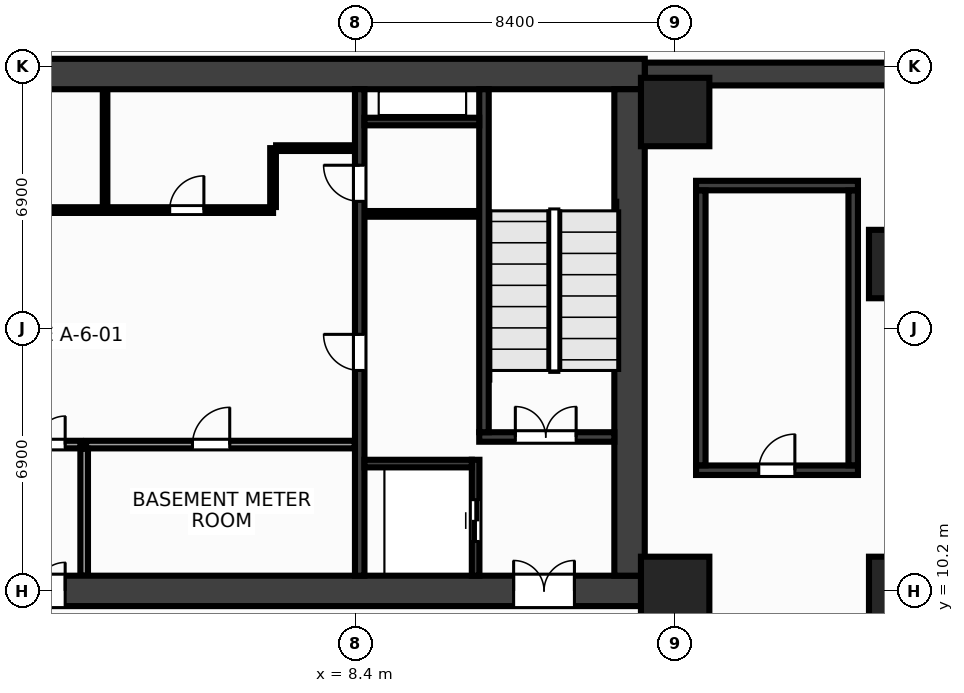
"""IFC4 building model, lengths in metres.
Left out: names, types, materials, properties, quantities, classifications, styles, units other than length and angle.
Written with IfcOpenShell. Run it as: python <this file> out.ifc"""

import sys

from ifc_helpers import new_model, si_unit, direction, frame, frame_2d, origin, origin_2d, place, context, subcontext, project, spatial, rectangle, extrude, source, transform, mapped, element, fill, save


model = new_model("IFC4")
c1 = context("Model", 3, precision=1e-05, world=origin(), true_north=direction((0.0, 1.0)))
c2 = subcontext(c1, "Body", "Model", "MODEL_VIEW")
j1 = project(units=[si_unit("LENGTHUNIT", "METRE"), si_unit("PLANEANGLEUNIT", "RADIAN")], contexts=[c1])
p1 = place(None, origin())
s1 = spatial("IfcSite", under=j1, at=p1, CompositionType="ELEMENT")
p2 = place(p1, origin())
s2 = spatial("IfcBuilding", under=s1, at=p2, CompositionType="ELEMENT")
p3 = place(p2, frame((0.0, 0.0, -5.5)))
s3 = spatial("IfcBuildingStorey", under=s2, at=p3, CompositionType="ELEMENT", Elevation=-5.5)
m1 = source(origin(), c2, "Body", "SweptSolid", [
    extrude(rectangle(XDim=22.9, YDim=0.6, at=frame_2d((11.45, 0.0))), origin(), (0.0, 0.0, 1.0), 5.5),
])
p4 = place(p3, frame((16.0, 23.8, 0.0), z_axis=(0.0, 0.0, 1.0), x_axis=(1.0, 0.0, 0.0)))
e1 = element("IfcWall", 1, at=p4, inside=s3, PredefinedType="SHEAR", context=c2, shape_type="MappedRepresentation", body=[
    mapped(m1, transform((0.0, 0.0, 0.0), x_axis=(1.0, 0.0, 0.0), y_axis=(0.0, 1.0, 0.0), z_axis=(0.0, 0.0, 1.0), scale=1.0)),
])
m2 = source(origin(), c2, "Body", "SweptSolid", [
    extrude(rectangle(XDim=32.0, YDim=0.8, at=frame_2d((16.0, 0.0))), origin(), (0.0, 0.0, 1.0), 5.5),
])
p5 = place(p3, frame((-16.0, 23.8, 0.0), z_axis=(0.0, 0.0, 1.0), x_axis=(1.0, 0.0, 0.0)))
e2 = element("IfcWall", 2, at=p5, inside=s3, PredefinedType="SHEAR", context=c2, shape_type="MappedRepresentation", body=[
    mapped(m2, transform((0.0, 0.0, 0.0), x_axis=(1.0, 0.0, 0.0), y_axis=(0.0, 1.0, 0.0), z_axis=(0.0, 0.0, 1.0), scale=1.0)),
])
p6 = place(p3, frame((-16.0, 10.2, 0.0), z_axis=(0.0, 0.0, 1.0), x_axis=(1.0, 0.0, 0.0)))
e3 = element("IfcWall", 3, at=p6, inside=s3, PredefinedType="SHEAR", context=c2, shape_type="MappedRepresentation", body=[
    mapped(m2, transform((0.0, 0.0, 0.0), x_axis=(1.0, 0.0, 0.0), y_axis=(0.0, 1.0, 0.0), z_axis=(0.0, 0.0, 1.0), scale=1.0)),
])
p7 = place(p6, frame((1.85, 0.0, 0.0)))
e4 = element("IfcOpeningElement", 4, at=p7, cuts=e3, PredefinedType="OPENING", context=c2, shape_type="SweptSolid", body=[
    extrude(rectangle(XDim=1.6, YDim=2.15, at=frame_2d((0.8, 1.075))), frame((0.0, 0.412, 0.0), z_axis=(0.0, -1.0, 0.0), x_axis=(1.0, 0.0, 0.0)), (0.0, 0.0, 1.0), 0.824),
])
p8 = place(p6, frame((28.55, 0.0, 0.0)))
e5 = element("IfcOpeningElement", 5, at=p8, cuts=e3, PredefinedType="OPENING", context=c2, shape_type="SweptSolid", body=[
    extrude(rectangle(XDim=1.6, YDim=2.15, at=frame_2d((0.8, 1.075))), frame((0.0, 0.412, 0.0), z_axis=(0.0, -1.0, 0.0), x_axis=(1.0, 0.0, 0.0)), (0.0, 0.0, 1.0), 0.824),
])
p9 = place(p6, frame((15.25, 0.0, 0.0)))
e6 = element("IfcOpeningElement", 6, at=p9, cuts=e3, PredefinedType="OPENING", context=c2, shape_type="SweptSolid", body=[
    extrude(rectangle(XDim=1.5, YDim=2.2, at=frame_2d((0.75, 1.1))), frame((0.0, 0.412, 0.0), z_axis=(0.0, -1.0, 0.0), x_axis=(1.0, 0.0, 0.0)), (0.0, 0.0, 1.0), 0.824),
])
m3 = source(origin(), c2, "Body", "SweptSolid", [
    extrude(rectangle(XDim=12.8, YDim=0.8, at=frame_2d((6.4, 0.0))), origin(), (0.0, 0.0, 1.0), 5.5),
])
p10 = place(p3, frame((15.6, 10.6, 0.0), z_axis=(0.0, 0.0, 1.0), x_axis=(0.0, 1.0, 0.0)))
e7 = element("IfcWall", 7, at=p10, inside=s3, PredefinedType="SHEAR", context=c2, shape_type="MappedRepresentation", body=[
    mapped(m3, transform((0.0, 0.0, 0.0), x_axis=(1.0, 0.0, 0.0), y_axis=(0.0, 1.0, 0.0), z_axis=(0.0, 0.0, 1.0), scale=1.0)),
])
m4 = source(origin(), c2, "Body", "SweptSolid", [
    extrude(rectangle(XDim=12.8, YDim=0.25, at=frame_2d((6.4, 0.0))), origin(), (0.0, 0.0, 1.0), 5.5),
])
p11 = place(p3, frame((8.5, 10.6, 0.0), z_axis=(0.0, 0.0, 1.0), x_axis=(0.0, 1.0, 0.0)))
e8 = element("IfcWall", 8, at=p11, inside=s3, PredefinedType="SHEAR", context=c2, shape_type="MappedRepresentation", body=[
    mapped(m4, transform((0.0, 0.0, 0.0), x_axis=(1.0, 0.0, 0.0), y_axis=(0.0, 1.0, 0.0), z_axis=(0.0, 0.0, 1.0), scale=1.0)),
])
p12 = place(p11, frame((5.4, 0.0, 0.0)))
e9 = element("IfcOpeningElement", 9, at=p12, cuts=e8, PredefinedType="OPENING", context=c2, shape_type="SweptSolid", body=[
    extrude(rectangle(XDim=0.95, YDim=2.15, at=frame_2d((0.475, 1.075))), frame((0.0, 0.137, 0.0), z_axis=(0.0, -1.0, 0.0), x_axis=(1.0, 0.0, 0.0)), (0.0, 0.0, 1.0), 0.274),
])
p13 = place(p11, frame((9.85, 0.0, 0.0)))
e10 = element("IfcOpeningElement", 10, at=p13, cuts=e8, PredefinedType="OPENING", context=c2, shape_type="SweptSolid", body=[
    extrude(rectangle(XDim=0.95, YDim=2.15, at=frame_2d((0.475, 1.075))), frame((0.0, 0.137, 0.0), z_axis=(0.0, -1.0, 0.0), x_axis=(1.0, 0.0, 0.0)), (0.0, 0.0, 1.0), 0.274),
])
m5 = source(origin(), c2, "Body", "SweptSolid", [
    extrude(rectangle(XDim=3.555, YDim=0.25, at=frame_2d((1.777, 0.0))), origin(), (0.0, 0.0, 1.0), 5.5),
])
p14 = place(p3, frame((11.645, 14.25, 0.0), z_axis=(0.0, 0.0, 1.0), x_axis=(1.0, 0.0, 0.0)))
e11 = element("IfcWall", 11, at=p14, inside=s3, PredefinedType="SHEAR", context=c2, shape_type="MappedRepresentation", body=[
    mapped(m5, transform((0.0, 0.0, 0.0), x_axis=(1.0, 0.0, 0.0), y_axis=(0.0, 1.0, 0.0), z_axis=(0.0, 0.0, 1.0), scale=1.0)),
])
p15 = place(p14, frame((0.95, 0.0, 0.0)))
e12 = element("IfcOpeningElement", 12, at=p15, cuts=e11, PredefinedType="OPENING", context=c2, shape_type="SweptSolid", body=[
    extrude(rectangle(XDim=1.6, YDim=2.15, at=frame_2d((0.8, 1.075))), frame((0.0, 0.137, 0.0), z_axis=(0.0, -1.0, 0.0), x_axis=(1.0, 0.0, 0.0)), (0.0, 0.0, 1.0), 0.274),
])
m6 = source(origin(), c2, "Body", "SweptSolid", [
    extrude(rectangle(XDim=9.025, YDim=0.25, at=frame_2d((4.512, 0.0))), origin(), (0.0, 0.0, 1.0), 5.5),
])
p16 = place(p3, frame((11.77, 14.375, 0.0), z_axis=(0.0, 0.0, 1.0), x_axis=(0.0, 1.0, 0.0)))
e13 = element("IfcWall", 13, at=p16, inside=s3, PredefinedType="SHEAR", context=c2, shape_type="MappedRepresentation", body=[
    mapped(m6, transform((0.0, 0.0, 0.0), x_axis=(1.0, 0.0, 0.0), y_axis=(0.0, 1.0, 0.0), z_axis=(0.0, 0.0, 1.0), scale=1.0)),
])
m7 = source(origin(), c2, "Body", "SweptSolid", [
    extrude(rectangle(XDim=3.05, YDim=0.2, at=frame_2d((1.525, 0.0))), origin(), (0.0, 0.0, 1.0), 5.5),
])
p17 = place(p3, frame((11.55, 10.6, 0.0), z_axis=(0.0, 0.0, 1.0), x_axis=(0.0, 1.0, 0.0)))
e14 = element("IfcWall", 14, at=p17, inside=s3, PredefinedType="SHEAR", context=c2, shape_type="MappedRepresentation", body=[
    mapped(m7, transform((0.0, 0.0, 0.0), x_axis=(1.0, 0.0, 0.0), y_axis=(0.0, 1.0, 0.0), z_axis=(0.0, 0.0, 1.0), scale=1.0)),
])
p18 = place(p17, frame((0.9, 0.0, 0.0)))
e15 = element("IfcOpeningElement", 15, at=p18, cuts=e14, PredefinedType="OPENING", context=c2, shape_type="SweptSolid", body=[
    extrude(rectangle(XDim=1.1, YDim=2.15, at=frame_2d((0.55, 1.075))), frame((0.0, 0.112, 0.0), z_axis=(0.0, -1.0, 0.0), x_axis=(1.0, 0.0, 0.0)), (0.0, 0.0, 1.0), 0.224),
])
m8 = source(origin(), c2, "Body", "SweptSolid", [
    extrude(rectangle(XDim=2.825, YDim=0.2, at=frame_2d((1.413, 0.0))), origin(), (0.0, 0.0, 1.0), 5.5),
])
p19 = place(p3, frame((8.625, 13.55, 0.0), z_axis=(0.0, 0.0, 1.0), x_axis=(1.0, 0.0, 0.0)))
e16 = element("IfcWall", 16, at=p19, inside=s3, PredefinedType="SHEAR", context=c2, shape_type="MappedRepresentation", body=[
    mapped(m8, transform((0.0, 0.0, 0.0), x_axis=(1.0, 0.0, 0.0), y_axis=(0.0, 1.0, 0.0), z_axis=(0.0, 0.0, 1.0), scale=1.0)),
])
m9 = source(origin(), c2, "Body", "SweptSolid", [
    extrude(rectangle(XDim=3.02, YDim=0.2, at=frame_2d((1.51, 0.0))), origin(), (0.0, 0.0, 1.0), 5.5),
])
p20 = place(p3, frame((8.625, 22.55, 0.0), z_axis=(0.0, 0.0, 1.0), x_axis=(1.0, 0.0, 0.0)))
e17 = element("IfcWall", 17, at=p20, inside=s3, PredefinedType="SHEAR", context=c2, shape_type="MappedRepresentation", body=[
    mapped(m9, transform((0.0, 0.0, 0.0), x_axis=(1.0, 0.0, 0.0), y_axis=(0.0, 1.0, 0.0), z_axis=(0.0, 0.0, 1.0), scale=1.0)),
])
m10 = source(origin(), c2, "Body", "SweptSolid", [
    extrude(rectangle(XDim=4.26, YDim=0.25, at=frame_2d((2.13, 0.0))), origin(), (0.0, 0.0, 1.0), 5.5),
])
p21 = place(p3, frame((17.35, 20.865, 0.0), z_axis=(0.0, 0.0, 1.0), x_axis=(1.0, 0.0, 0.0)))
e18 = element("IfcWall", 18, at=p21, inside=s3, PredefinedType="SHEAR", context=c2, shape_type="MappedRepresentation", body=[
    mapped(m10, transform((0.0, 0.0, 0.0), x_axis=(1.0, 0.0, 0.0), y_axis=(0.0, 1.0, 0.0), z_axis=(0.0, 0.0, 1.0), scale=1.0)),
])
p22 = place(p3, frame((17.35, 13.375, 0.0), z_axis=(0.0, 0.0, 1.0), x_axis=(1.0, 0.0, 0.0)))
e19 = element("IfcWall", 19, at=p22, inside=s3, PredefinedType="SHEAR", context=c2, shape_type="MappedRepresentation", body=[
    mapped(m10, transform((0.0, 0.0, 0.0), x_axis=(1.0, 0.0, 0.0), y_axis=(0.0, 1.0, 0.0), z_axis=(0.0, 0.0, 1.0), scale=1.0)),
])
p23 = place(p22, frame((1.65, 0.0, 0.0)))
e20 = element("IfcOpeningElement", 20, at=p23, cuts=e19, PredefinedType="OPENING", context=c2, shape_type="SweptSolid", body=[
    extrude(rectangle(XDim=0.95, YDim=2.15, at=frame_2d((0.475, 1.075))), frame((0.0, 0.137, 0.0), z_axis=(0.0, -1.0, 0.0), x_axis=(1.0, 0.0, 0.0)), (0.0, 0.0, 1.0), 0.274),
])
m11 = source(origin(), c2, "Body", "SweptSolid", [
    extrude(rectangle(XDim=7.23, YDim=0.25, at=frame_2d((3.615, 0.0))), origin(), (0.0, 0.0, 1.0), 5.5),
])
for number, where, z_axis, x_axis in (
    (21, (17.475, 13.505, 0.0), (0.0, 0.0, 1.0), (0.0, 1.0, 0.0)),
    (22, (21.485, 13.505, 0.0), (0.0, 0.0, 1.0), (0.0, 1.0, 0.0)),
):
    element("IfcWall", number, at=place(p3, frame(where, z_axis=z_axis, x_axis=x_axis)), inside=s3, PredefinedType="SHEAR", context=c2, shape_type="MappedRepresentation", body=[
        mapped(m11, transform((0.0, 0.0, 0.0), x_axis=(1.0, 0.0, 0.0), y_axis=(0.0, 1.0, 0.0), z_axis=(0.0, 0.0, 1.0), scale=1.0)),
    ])
m12 = source(origin(), c2, "Body", "SweptSolid", [
    extrude(rectangle(XDim=1.8, YDim=1.8, at=origin_2d()), origin(), (0.0, 0.0, 1.0), 5.5),
])
for number, where, z_axis, x_axis in (
    (23, (16.8, 10.2, 0.0), (0.0, 0.0, 1.0), (1.0, 0.0, 0.0)),
    (24, (16.8, 22.8, 0.0), (0.0, 0.0, 1.0), (1.0, 0.0, 0.0)),
    (25, (22.8, 10.2, 0.0), (0.0, 0.0, 1.0), (1.0, 0.0, 0.0)),
    (26, (22.8, 18.8, 0.0), (0.0, 0.0, 1.0), (1.0, 0.0, 0.0)),
):
    element("IfcColumn", number, at=place(p3, frame(where, z_axis=z_axis, x_axis=x_axis)), inside=s3, PredefinedType="COLUMN", context=c2, shape_type="MappedRepresentation", body=[
        mapped(m12, transform((0.0, 0.0, 0.0), x_axis=(1.0, 0.0, 0.0), y_axis=(0.0, 1.0, 0.0), z_axis=(0.0, 0.0, 1.0), scale=1.0)),
    ])
m13 = source(origin(), c2, "Body", "SweptSolid", [
    extrude(rectangle(XDim=3.01, YDim=0.15, at=frame_2d((1.505, 0.0))), origin(), (0.0, 0.0, 1.0), 5.14),
])
p24 = place(p3, frame((8.63, 20.12, 0.0), z_axis=(0.0, 0.0, 1.0), x_axis=(1.0, 0.0, 0.0)))
e27 = element("IfcWall", 27, at=p24, inside=s3, PredefinedType="PARTITIONING", context=c2, shape_type="MappedRepresentation", body=[
    mapped(m13, transform((0.0, 0.0, 0.0), x_axis=(1.0, 0.0, 0.0), y_axis=(0.0, 1.0, 0.0), z_axis=(0.0, 0.0, 1.0), scale=1.0)),
])
m14 = source(origin(), c2, "Body", "SweptSolid", [
    extrude(rectangle(XDim=7.07, YDim=0.2, at=frame_2d((3.535, 0.0))), origin(), (0.0, 0.0, 1.0), 5.14),
])
p25 = place(p3, frame((1.3, 14.05, 0.0), z_axis=(0.0, 0.0, 1.0), x_axis=(1.0, 0.0, 0.0)))
e28 = element("IfcWall", 28, at=p25, inside=s3, PredefinedType="PARTITIONING", context=c2, shape_type="MappedRepresentation", body=[
    mapped(m14, transform((0.0, 0.0, 0.0), x_axis=(1.0, 0.0, 0.0), y_axis=(0.0, 1.0, 0.0), z_axis=(0.0, 0.0, 1.0), scale=1.0)),
])
p26 = place(p25, frame((2.8, 0.0, 0.0)))
e29 = element("IfcOpeningElement", 29, at=p26, cuts=e28, PredefinedType="OPENING", context=c2, shape_type="SweptSolid", body=[
    extrude(rectangle(XDim=0.98, YDim=2.15, at=frame_2d((0.49, 1.075))), frame((0.0, 0.112, 0.0), z_axis=(0.0, -1.0, 0.0), x_axis=(1.0, 0.0, 0.0)), (0.0, 0.0, 1.0), 0.224),
])
m15 = source(origin(), c2, "Body", "SweptSolid", [
    extrude(rectangle(XDim=3.34, YDim=0.2, at=frame_2d((1.67, 0.0))), origin(), (0.0, 0.0, 1.0), 5.14),
])
p27 = place(p3, frame((1.25, 10.6, 0.0), z_axis=(0.0, 0.0, 1.0), x_axis=(0.0, 1.0, 0.0)))
e30 = element("IfcWall", 30, at=p27, inside=s3, PredefinedType="PARTITIONING", context=c2, shape_type="MappedRepresentation", body=[
    mapped(m15, transform((0.0, 0.0, 0.0), x_axis=(1.0, 0.0, 0.0), y_axis=(0.0, 1.0, 0.0), z_axis=(0.0, 0.0, 1.0), scale=1.0)),
])
m16 = source(origin(), c2, "Body", "SweptSolid", [
    extrude(rectangle(XDim=2.3, YDim=0.2, at=frame_2d((1.15, 0.0))), origin(), (0.0, 0.0, 1.0), 5.14),
])
p28 = place(p3, frame((-1.15, 14.05, 0.0), z_axis=(0.0, 0.0, 1.0), x_axis=(1.0, 0.0, 0.0)))
e31 = element("IfcWall", 31, at=p28, inside=s3, PredefinedType="PARTITIONING", context=c2, shape_type="MappedRepresentation", body=[
    mapped(m16, transform((0.0, 0.0, 0.0), x_axis=(1.0, 0.0, 0.0), y_axis=(0.0, 1.0, 0.0), z_axis=(0.0, 0.0, 1.0), scale=1.0)),
])
p29 = place(p28, frame((0.4, 0.0, 0.0)))
e32 = element("IfcOpeningElement", 32, at=p29, cuts=e31, PredefinedType="OPENING", context=c2, shape_type="SweptSolid", body=[
    extrude(rectangle(XDim=1.5, YDim=2.2, at=frame_2d((0.75, 1.1))), frame((0.0, 0.112, 0.0), z_axis=(0.0, -1.0, 0.0), x_axis=(1.0, 0.0, 0.0)), (0.0, 0.0, 1.0), 0.224),
])
m17 = source(origin(), c2, "Body", "SweptSolid", [
    extrude(rectangle(XDim=14.59, YDim=0.15, at=frame_2d((7.295, 0.0))), origin(), (0.0, 0.0, 1.0), 5.14),
])
p30 = place(p3, frame((-8.37, 20.22, 0.0), z_axis=(0.0, 0.0, 1.0), x_axis=(1.0, 0.0, 0.0)))
e33 = element("IfcWall", 33, at=p30, inside=s3, PredefinedType="PARTITIONING", context=c2, shape_type="MappedRepresentation", body=[
    mapped(m17, transform((0.0, 0.0, 0.0), x_axis=(1.0, 0.0, 0.0), y_axis=(0.0, 1.0, 0.0), z_axis=(0.0, 0.0, 1.0), scale=1.0)),
])
p31 = place(p30, frame((1.06, 0.0, 0.0)))
e34 = element("IfcOpeningElement", 34, at=p31, cuts=e33, PredefinedType="OPENING", context=c2, shape_type="SweptSolid", body=[
    extrude(rectangle(XDim=0.9, YDim=2.15, at=frame_2d((0.45, 1.075))), frame((0.0, 0.087, 0.0), z_axis=(0.0, -1.0, 0.0), x_axis=(1.0, 0.0, 0.0)), (0.0, 0.0, 1.0), 0.174),
])
p32 = place(p30, frame((4.22, 0.0, 0.0)))
e35 = element("IfcOpeningElement", 35, at=p32, cuts=e33, PredefinedType="OPENING", context=c2, shape_type="SweptSolid", body=[
    extrude(rectangle(XDim=0.9, YDim=2.15, at=frame_2d((0.45, 1.075))), frame((0.0, 0.087, 0.0), z_axis=(0.0, -1.0, 0.0), x_axis=(1.0, 0.0, 0.0)), (0.0, 0.0, 1.0), 0.174),
])
p33 = place(p30, frame((7.82, 0.0, 0.0)))
e36 = element("IfcOpeningElement", 36, at=p33, cuts=e33, PredefinedType="OPENING", context=c2, shape_type="SweptSolid", body=[
    extrude(rectangle(XDim=0.9, YDim=2.15, at=frame_2d((0.45, 1.075))), frame((0.0, 0.087, 0.0), z_axis=(0.0, -1.0, 0.0), x_axis=(1.0, 0.0, 0.0)), (0.0, 0.0, 1.0), 0.174),
])
p34 = place(p30, frame((11.87, 0.0, 0.0)))
e37 = element("IfcOpeningElement", 37, at=p34, cuts=e33, PredefinedType="OPENING", context=c2, shape_type="SweptSolid", body=[
    extrude(rectangle(XDim=0.9, YDim=2.15, at=frame_2d((0.45, 1.075))), frame((0.0, 0.087, 0.0), z_axis=(0.0, -1.0, 0.0), x_axis=(1.0, 0.0, 0.0)), (0.0, 0.0, 1.0), 0.174),
])
m18 = source(origin(), c2, "Body", "SweptSolid", [
    extrude(rectangle(XDim=1.55, YDim=0.15, at=frame_2d((0.775, 0.0))), origin(), (0.0, 0.0, 1.0), 5.14),
])
p35 = place(p3, frame((6.22, 20.3, 0.0), z_axis=(0.0, 0.0, 1.0), x_axis=(0.0, 1.0, 0.0)))
e38 = element("IfcWall", 38, at=p35, inside=s3, PredefinedType="PARTITIONING", context=c2, shape_type="MappedRepresentation", body=[
    mapped(m18, transform((0.0, 0.0, 0.0), x_axis=(1.0, 0.0, 0.0), y_axis=(0.0, 1.0, 0.0), z_axis=(0.0, 0.0, 1.0), scale=1.0)),
])
m19 = source(origin(), c2, "Body", "SweptSolid", [
    extrude(rectangle(XDim=2.07, YDim=0.15, at=frame_2d((1.035, 0.0))), origin(), (0.0, 0.0, 1.0), 5.14),
])
p36 = place(p3, frame((6.3, 21.85, 0.0), z_axis=(0.0, 0.0, 1.0), x_axis=(1.0, 0.0, 0.0)))
e39 = element("IfcWall", 39, at=p36, inside=s3, PredefinedType="PARTITIONING", context=c2, shape_type="MappedRepresentation", body=[
    mapped(m19, transform((0.0, 0.0, 0.0), x_axis=(1.0, 0.0, 0.0), y_axis=(0.0, 1.0, 0.0), z_axis=(0.0, 0.0, 1.0), scale=1.0)),
])
m20 = source(origin(), c2, "Body", "SweptSolid", [
    extrude(rectangle(XDim=3.04, YDim=0.12, at=frame_2d((1.52, 0.0))), origin(), (0.0, 0.0, 1.0), 5.14),
])
p37 = place(p3, frame((1.8, 20.32, 0.0), z_axis=(0.0, 0.0, 1.0), x_axis=(0.0, 1.0, 0.0)))
e40 = element("IfcWall", 40, at=p37, inside=s3, PredefinedType="PARTITIONING", context=c2, shape_type="MappedRepresentation", body=[
    mapped(m20, transform((0.0, 0.0, 0.0), x_axis=(1.0, 0.0, 0.0), y_axis=(0.0, 1.0, 0.0), z_axis=(0.0, 0.0, 1.0), scale=1.0)),
])
m21 = source(origin(), c2, "Body", "SweptSolid", [
    extrude(rectangle(XDim=1.6, YDim=2.15, at=frame_2d((0.8, 1.075))), frame((0.0, 0.025, 0.0), z_axis=(0.0, -1.0, 0.0), x_axis=(1.0, 0.0, 0.0)), (0.0, 0.0, 1.0), 0.05),
])
p38 = place(p15, origin())
e41 = element("IfcDoor", 41, at=p38, inside=s3, OperationType="DOUBLE_DOOR_SINGLE_SWING", PredefinedType="DOOR", context=c2, shape_type="MappedRepresentation", body=[
    mapped(m21, transform((0.0, 0.0, 0.0), x_axis=(1.0, 0.0, 0.0), y_axis=(0.0, 1.0, 0.0), z_axis=(0.0, 0.0, 1.0), scale=1.0)),
])
fill(e12, e41)
p39 = place(p8, origin())
e42 = element("IfcDoor", 42, at=p39, inside=s3, OperationType="DOUBLE_DOOR_SINGLE_SWING", PredefinedType="DOOR", context=c2, shape_type="MappedRepresentation", body=[
    mapped(m21, transform((0.0, 0.0, 0.0), x_axis=(1.0, 0.0, 0.0), y_axis=(0.0, 1.0, 0.0), z_axis=(0.0, 0.0, 1.0), scale=1.0)),
])
fill(e5, e42)
m22 = source(origin(), c2, "Body", "SweptSolid", [
    extrude(rectangle(XDim=1.1, YDim=2.15, at=frame_2d((0.55, 1.075))), frame((0.0, 0.025, 0.0), z_axis=(0.0, -1.0, 0.0), x_axis=(1.0, 0.0, 0.0)), (0.0, 0.0, 1.0), 0.05),
])
p40 = place(p18, origin())
e43 = element("IfcDoor", 43, at=p40, inside=s3, OperationType="DOUBLE_DOOR_SLIDING", PredefinedType="DOOR", context=c2, shape_type="MappedRepresentation", body=[
    mapped(m22, transform((0.0, 0.0, 0.0), x_axis=(1.0, 0.0, 0.0), y_axis=(0.0, 1.0, 0.0), z_axis=(0.0, 0.0, 1.0), scale=1.0)),
])
fill(e15, e43)
m23 = source(origin(), c2, "Body", "SweptSolid", [
    extrude(rectangle(XDim=0.95, YDim=2.15, at=frame_2d((0.475, 1.075))), frame((0.0, 0.025, 0.0), z_axis=(0.0, -1.0, 0.0), x_axis=(1.0, 0.0, 0.0)), (0.0, 0.0, 1.0), 0.05),
])
p41 = place(p23, origin())
e44 = element("IfcDoor", 44, at=p41, inside=s3, OperationType="SINGLE_SWING_RIGHT", PredefinedType="DOOR", context=c2, shape_type="MappedRepresentation", body=[
    mapped(m23, transform((0.0, 0.0, 0.0), x_axis=(1.0, 0.0, 0.0), y_axis=(0.0, 1.0, 0.0), z_axis=(0.0, 0.0, 1.0), scale=1.0)),
])
fill(e20, e44)
p42 = place(p12, origin())
e45 = element("IfcDoor", 45, at=p42, inside=s3, OperationType="SINGLE_SWING_RIGHT", PredefinedType="DOOR", context=c2, shape_type="MappedRepresentation", body=[
    mapped(m23, transform((0.0, 0.0, 0.0), x_axis=(1.0, 0.0, 0.0), y_axis=(0.0, 1.0, 0.0), z_axis=(0.0, 0.0, 1.0), scale=1.0)),
])
fill(e9, e45)
m24 = source(origin(), c2, "Body", "SweptSolid", [
    extrude(rectangle(XDim=0.95, YDim=2.15, at=frame_2d((0.475, 1.075))), frame((0.0, 0.025, 0.0), z_axis=(0.0, -1.0, 0.0), x_axis=(1.0, 0.0, 0.0)), (0.0, 0.0, 1.0), 0.05),
])
p43 = place(p13, origin())
e46 = element("IfcDoor", 46, at=p43, inside=s3, OperationType="SINGLE_SWING_RIGHT", PredefinedType="DOOR", context=c2, shape_type="MappedRepresentation", body=[
    mapped(m24, transform((0.0, 0.0, 0.0), x_axis=(1.0, 0.0, 0.0), y_axis=(0.0, 1.0, 0.0), z_axis=(0.0, 0.0, 1.0), scale=1.0)),
])
fill(e10, e46)
m25 = source(origin(), c2, "Body", "SweptSolid", [
    extrude(rectangle(XDim=0.98, YDim=2.15, at=frame_2d((0.49, 1.075))), frame((0.0, 0.025, 0.0), z_axis=(0.0, -1.0, 0.0), x_axis=(1.0, 0.0, 0.0)), (0.0, 0.0, 1.0), 0.05),
])
p44 = place(p26, origin())
e47 = element("IfcDoor", 47, at=p44, inside=s3, OperationType="SINGLE_SWING_RIGHT", PredefinedType="DOOR", context=c2, shape_type="MappedRepresentation", body=[
    mapped(m25, transform((0.0, 0.0, 0.0), x_axis=(1.0, 0.0, 0.0), y_axis=(0.0, 1.0, 0.0), z_axis=(0.0, 0.0, 1.0), scale=1.0)),
])
fill(e29, e47)
m26 = source(origin(), c2, "Body", "SweptSolid", [
    extrude(rectangle(XDim=1.5, YDim=2.2, at=frame_2d((0.75, 1.1))), frame((0.0, 0.025, 0.0), z_axis=(0.0, -1.0, 0.0), x_axis=(1.0, 0.0, 0.0)), (0.0, 0.0, 1.0), 0.05),
])
p45 = place(p29, origin())
e48 = element("IfcDoor", 48, at=p45, inside=s3, OperationType="DOUBLE_DOOR_SINGLE_SWING", PredefinedType="DOOR", context=c2, shape_type="MappedRepresentation", body=[
    mapped(m26, transform((0.0, 0.0, 0.0), x_axis=(1.0, 0.0, 0.0), y_axis=(0.0, 1.0, 0.0), z_axis=(0.0, 0.0, 1.0), scale=1.0)),
])
fill(e32, e48)
p46 = place(p9, origin())
e49 = element("IfcDoor", 49, at=p46, inside=s3, OperationType="DOUBLE_DOOR_SINGLE_SWING", PredefinedType="DOOR", context=c2, shape_type="MappedRepresentation", body=[
    mapped(m26, transform((0.0, 0.0, 0.0), x_axis=(1.0, 0.0, 0.0), y_axis=(0.0, 1.0, 0.0), z_axis=(0.0, 0.0, 1.0), scale=1.0)),
])
fill(e6, e49)
m27 = source(origin(), c2, "Body", "SweptSolid", [
    extrude(rectangle(XDim=0.9, YDim=2.15, at=frame_2d((0.45, 1.075))), frame((0.0, 0.025, 0.0), z_axis=(0.0, -1.0, 0.0), x_axis=(1.0, 0.0, 0.0)), (0.0, 0.0, 1.0), 0.05),
])
p47 = place(p34, origin())
e50 = element("IfcDoor", 50, at=p47, inside=s3, OperationType="SINGLE_SWING_RIGHT", PredefinedType="DOOR", context=c2, shape_type="MappedRepresentation", body=[
    mapped(m27, transform((0.0, 0.0, 0.0), x_axis=(1.0, 0.0, 0.0), y_axis=(0.0, 1.0, 0.0), z_axis=(0.0, 0.0, 1.0), scale=1.0)),
])
fill(e37, e50)
save(model, sys.argv[1])
